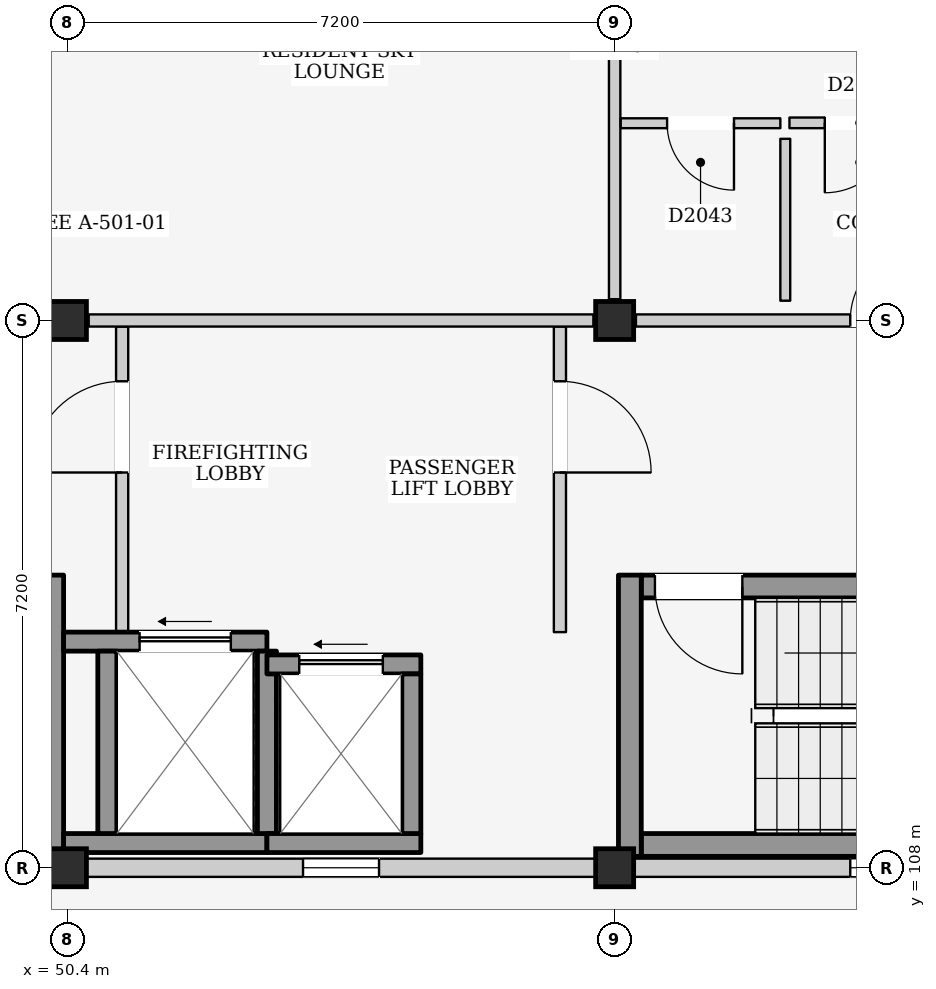
"""IFC4 building model, lengths in metres.
Left out: names, types, materials, properties, quantities, classifications, styles, units other than length and angle.
Written with IfcOpenShell. Run it as: python <this file> out.ifc"""

import sys

from ifc_helpers import new_model, si_unit, direction, frame, frame_2d, origin, origin_2d, place, context, subcontext, project, spatial, rectangle, extrude, element, fill, save


model = new_model("IFC4")
c1 = context("Model", 3, precision=1e-05, world=origin(), true_north=direction((0.0, 1.0)))
c2 = subcontext(c1, "Body", "Model", "MODEL_VIEW")
j1 = project(units=[si_unit("LENGTHUNIT", "METRE"), si_unit("PLANEANGLEUNIT", "RADIAN")], contexts=[c1])
p1 = place(None, origin())
s1 = spatial("IfcSite", under=j1, at=p1, CompositionType="ELEMENT")
p2 = place(p1, origin())
s2 = spatial("IfcBuilding", under=s1, at=p2, CompositionType="ELEMENT")
p3 = place(p2, frame((0.0, 0.0, 44.4)))
s3 = spatial("IfcBuildingStorey", under=s2, at=p3, CompositionType="ELEMENT", Elevation=44.4)
for number, where, z_axis, x_axis in (
    (1, (50.4, 108.0, 0.0), (0.0, 0.0, 1.0), (1.0, 0.0, 0.0)),
    (2, (50.4, 115.2, 0.0), (0.0, 0.0, 1.0), (1.0, 0.0, 0.0)),
    (3, (57.6, 108.0, 0.0), (0.0, 0.0, 1.0), (1.0, 0.0, 0.0)),
    (4, (57.6, 115.2, 0.0), (0.0, 0.0, 1.0), (1.0, 0.0, 0.0)),
):
    element("IfcColumn", number, at=place(p3, frame(where, z_axis=z_axis, x_axis=x_axis)), inside=s3, PredefinedType="COLUMN", context=c2, shape_type="SweptSolid", body=[
        extrude(rectangle(XDim=0.5, YDim=0.5, at=origin_2d()), origin(), (0.0, 0.0, 1.0), 3.3),
    ])
p4 = place(p3, frame((50.65, 108.0, 0.0), z_axis=(0.0, 0.0, 1.0), x_axis=(1.0, 0.0, 0.0)))
e5 = element("IfcWall", 5, at=p4, inside=s3, PredefinedType="ELEMENTEDWALL", context=c2, shape_type="SweptSolid", body=[
    extrude(rectangle(XDim=6.7, YDim=0.24, at=frame_2d((3.35, 0.0))), origin(), (0.0, 0.0, 1.0), 2.415),
])
p5 = place(p4, frame((2.85, 0.0, 1.2)))
e6 = element("IfcOpeningElement", 6, at=p5, cuts=e5, PredefinedType="OPENING", context=c2, shape_type="SweptSolid", body=[
    extrude(rectangle(XDim=1.0, YDim=0.9, at=frame_2d((0.5, 0.45))), frame((0.0, 0.135, 0.0), z_axis=(0.0, -1.0, 0.0), x_axis=(1.0, 0.0, 0.0)), (0.0, 0.0, 1.0), 0.27),
])
p6 = place(p3, frame((57.85, 108.0, 0.0), z_axis=(0.0, 0.0, 1.0), x_axis=(1.0, 0.0, 0.0)))
e7 = element("IfcWall", 7, at=p6, inside=s3, PredefinedType="ELEMENTEDWALL", context=c2, shape_type="SweptSolid", body=[
    extrude(rectangle(XDim=6.7, YDim=0.24, at=frame_2d((3.35, 0.0))), origin(), (0.0, 0.0, 1.0), 2.415),
])
p7 = place(p6, frame((2.85, 0.0, 1.2)))
e8 = element("IfcOpeningElement", 8, at=p7, cuts=e7, PredefinedType="OPENING", context=c2, shape_type="SweptSolid", body=[
    extrude(rectangle(XDim=1.0, YDim=0.9, at=frame_2d((0.5, 0.45))), frame((0.0, 0.135, 0.0), z_axis=(0.0, -1.0, 0.0), x_axis=(1.0, 0.0, 0.0)), (0.0, 0.0, 1.0), 0.27),
])
p8 = place(p3, frame((50.2, 108.15, 0.0), z_axis=(0.0, 0.0, 1.0), x_axis=(0.0, 1.0, 0.0)))
e9 = element("IfcWall", 9, at=p8, inside=s3, PredefinedType="SHEAR", context=c2, shape_type="SweptSolid", body=[
    extrude(rectangle(XDim=3.7, YDim=0.3, at=frame_2d((1.85, 0.0))), origin(), (0.0, 0.0, 1.0), 3.08),
])
p9 = place(p3, frame((51.12, 111.1, 0.0), z_axis=(0.0, 0.0, 1.0), x_axis=(0.0, 1.0, 0.0)))
e10 = element("IfcWall", 10, at=p9, inside=s3, PredefinedType="PARTITIONING", context=c2, shape_type="SweptSolid", body=[
    extrude(rectangle(XDim=4.02, YDim=0.16, at=frame_2d((2.01, 0.0))), origin(), (0.0, 0.0, 1.0), 3.08),
])
p10 = place(p9, frame((2.1, 0.0, 0.0)))
e11 = element("IfcOpeningElement", 11, at=p10, cuts=e10, PredefinedType="OPENING", context=c2, shape_type="SweptSolid", body=[
    extrude(rectangle(XDim=1.2, YDim=2.2, at=frame_2d((0.6, 1.1))), frame((0.0, 0.095, 0.0), z_axis=(0.0, -1.0, 0.0), x_axis=(1.0, 0.0, 0.0)), (0.0, 0.0, 1.0), 0.19),
])
p11 = place(p3, frame((56.88, 111.1, 0.0), z_axis=(0.0, 0.0, 1.0), x_axis=(0.0, 1.0, 0.0)))
e12 = element("IfcWall", 12, at=p11, inside=s3, PredefinedType="PARTITIONING", context=c2, shape_type="SweptSolid", body=[
    extrude(rectangle(XDim=4.02, YDim=0.16, at=frame_2d((2.01, 0.0))), origin(), (0.0, 0.0, 1.0), 3.08),
])
p12 = place(p11, frame((2.1, 0.0, 0.0)))
e13 = element("IfcOpeningElement", 13, at=p12, cuts=e12, PredefinedType="OPENING", context=c2, shape_type="SweptSolid", body=[
    extrude(rectangle(XDim=1.2, YDim=2.2, at=frame_2d((0.6, 1.1))), frame((0.0, 0.095, 0.0), z_axis=(0.0, -1.0, 0.0), x_axis=(1.0, 0.0, 0.0)), (0.0, 0.0, 1.0), 0.19),
])
p13 = place(p3, frame((50.35, 108.325, 0.0), z_axis=(0.0, 0.0, 1.0), x_axis=(1.0, 0.0, 0.0)))
e14 = element("IfcWall", 14, at=p13, inside=s3, PredefinedType="SHEAR", context=c2, shape_type="SweptSolid", body=[
    extrude(rectangle(XDim=2.675, YDim=0.25, at=frame_2d((1.337, 0.0))), origin(), (0.0, 0.0, 1.0), 3.08),
])
p14 = place(p3, frame((50.35, 110.975, 0.0), z_axis=(0.0, 0.0, 1.0), x_axis=(1.0, 0.0, 0.0)))
e15 = element("IfcWall", 15, at=p14, inside=s3, PredefinedType="SHEAR", context=c2, shape_type="SweptSolid", body=[
    extrude(rectangle(XDim=2.675, YDim=0.25, at=frame_2d((1.337, 0.0))), origin(), (0.0, 0.0, 1.0), 3.08),
])
p15 = place(p14, frame((1.0, 0.0, 0.0)))
e16 = element("IfcOpeningElement", 16, at=p15, cuts=e15, PredefinedType="OPENING", context=c2, shape_type="SweptSolid", body=[
    extrude(rectangle(XDim=1.2, YDim=2.25, at=frame_2d((0.6, 1.125))), frame((0.0, 0.14, 0.0), z_axis=(0.0, -1.0, 0.0), x_axis=(1.0, 0.0, 0.0)), (0.0, 0.0, 1.0), 0.28),
])
for number, where, z_axis, x_axis in (
    (17, (50.925, 108.45, 0.0), (0.0, 0.0, 1.0), (0.0, 1.0, 0.0)),
    (18, (53.025, 108.45, 0.0), (0.0, 0.0, 1.0), (0.0, 1.0, 0.0)),
):
    element("IfcWall", number, at=place(p3, frame(where, z_axis=z_axis, x_axis=x_axis)), inside=s3, PredefinedType="SHEAR", context=c2, shape_type="SweptSolid", body=[
        extrude(rectangle(XDim=2.4, YDim=0.25, at=frame_2d((1.2, 0.0))), origin(), (0.0, 0.0, 1.0), 3.08),
    ])
p16 = place(p3, frame((53.025, 108.325, 0.0), z_axis=(0.0, 0.0, 1.0), x_axis=(1.0, 0.0, 0.0)))
e19 = element("IfcWall", 19, at=p16, inside=s3, PredefinedType="SHEAR", context=c2, shape_type="SweptSolid", body=[
    extrude(rectangle(XDim=2.025, YDim=0.25, at=frame_2d((1.013, 0.0))), origin(), (0.0, 0.0, 1.0), 3.08),
])
p17 = place(p3, frame((53.025, 110.675, 0.0), z_axis=(0.0, 0.0, 1.0), x_axis=(1.0, 0.0, 0.0)))
e20 = element("IfcWall", 20, at=p17, inside=s3, PredefinedType="SHEAR", context=c2, shape_type="SweptSolid", body=[
    extrude(rectangle(XDim=2.025, YDim=0.25, at=frame_2d((1.013, 0.0))), origin(), (0.0, 0.0, 1.0), 3.08),
])
p18 = place(p17, frame((0.425, 0.0, 0.0)))
e21 = element("IfcOpeningElement", 21, at=p18, cuts=e20, PredefinedType="OPENING", context=c2, shape_type="SweptSolid", body=[
    extrude(rectangle(XDim=1.1, YDim=2.15, at=frame_2d((0.55, 1.075))), frame((0.0, 0.14, 0.0), z_axis=(0.0, -1.0, 0.0), x_axis=(1.0, 0.0, 0.0)), (0.0, 0.0, 1.0), 0.28),
])
p19 = place(p3, frame((54.925, 108.45, 0.0), z_axis=(0.0, 0.0, 1.0), x_axis=(0.0, 1.0, 0.0)))
e22 = element("IfcWall", 22, at=p19, inside=s3, PredefinedType="SHEAR", context=c2, shape_type="SweptSolid", body=[
    extrude(rectangle(XDim=2.1, YDim=0.25, at=frame_2d((1.05, 0.0))), origin(), (0.0, 0.0, 1.0), 3.08),
])
p20 = place(p3, frame((57.95, 108.3, 0.0), z_axis=(0.0, 0.0, 1.0), x_axis=(1.0, 0.0, 0.0)))
e23 = element("IfcWall", 23, at=p20, inside=s3, PredefinedType="SHEAR", context=c2, shape_type="SweptSolid", body=[
    extrude(rectangle(XDim=6.5, YDim=0.3, at=frame_2d((3.25, 0.0))), origin(), (0.0, 0.0, 1.0), 3.08),
])
p21 = place(p3, frame((57.95, 111.7, 0.0), z_axis=(0.0, 0.0, 1.0), x_axis=(1.0, 0.0, 0.0)))
e24 = element("IfcWall", 24, at=p21, inside=s3, PredefinedType="SHEAR", context=c2, shape_type="SweptSolid", body=[
    extrude(rectangle(XDim=6.5, YDim=0.3, at=frame_2d((3.25, 0.0))), origin(), (0.0, 0.0, 1.0), 3.08),
])
p22 = place(p21, frame((0.18, 0.0, 0.0)))
e25 = element("IfcOpeningElement", 25, at=p22, cuts=e24, PredefinedType="OPENING", context=c2, shape_type="SweptSolid", body=[
    extrude(rectangle(XDim=1.15, YDim=2.2, at=frame_2d((0.575, 1.1))), frame((0.0, 0.165, 0.0), z_axis=(0.0, -1.0, 0.0), x_axis=(1.0, 0.0, 0.0)), (0.0, 0.0, 1.0), 0.33),
])
p23 = place(p3, frame((57.8, 108.15, 0.0), z_axis=(0.0, 0.0, 1.0), x_axis=(0.0, 1.0, 0.0)))
e26 = element("IfcWall", 26, at=p23, inside=s3, PredefinedType="SHEAR", context=c2, shape_type="SweptSolid", body=[
    extrude(rectangle(XDim=3.7, YDim=0.3, at=frame_2d((1.85, 0.0))), origin(), (0.0, 0.0, 1.0), 3.08),
])
p24 = place(p3, frame((50.68, 115.2, 0.0), z_axis=(0.0, 0.0, 1.0), x_axis=(1.0, 0.0, 0.0)))
e27 = element("IfcWall", 27, at=p24, inside=s3, PredefinedType="PARTITIONING", context=c2, shape_type="SweptSolid", body=[
    extrude(rectangle(XDim=6.64, YDim=0.16, at=frame_2d((3.32, 0.0))), origin(), (0.0, 0.0, 1.0), 2.415),
])
p25 = place(p3, frame((57.6, 115.48, 0.0), z_axis=(0.0, 0.0, 1.0), x_axis=(0.0, 1.0, 0.0)))
e28 = element("IfcWall", 28, at=p25, inside=s3, PredefinedType="PARTITIONING", context=c2, shape_type="SweptSolid", body=[
    extrude(rectangle(XDim=6.64, YDim=0.15, at=frame_2d((3.32, 0.0))), origin(), (0.0, 0.0, 1.0), 2.565),
])
p26 = place(p3, frame((57.88, 115.2, 0.0), z_axis=(0.0, 0.0, 1.0), x_axis=(1.0, 0.0, 0.0)))
e29 = element("IfcWall", 29, at=p26, inside=s3, PredefinedType="PARTITIONING", context=c2, shape_type="SweptSolid", body=[
    extrude(rectangle(XDim=6.64, YDim=0.16, at=frame_2d((3.32, 0.0))), origin(), (0.0, 0.0, 1.0), 2.415),
])
p27 = place(p26, frame((2.82, 0.0, 0.0)))
e30 = element("IfcOpeningElement", 30, at=p27, cuts=e29, PredefinedType="OPENING", context=c2, shape_type="SweptSolid", body=[
    extrude(rectangle(XDim=1.0, YDim=2.15, at=frame_2d((0.5, 1.075))), frame((0.0, 0.095, 0.0), z_axis=(0.0, -1.0, 0.0), x_axis=(1.0, 0.0, 0.0)), (0.0, 0.0, 1.0), 0.19),
])
p28 = place(p3, frame((57.68, 117.795, 0.0), z_axis=(0.0, 0.0, 1.0), x_axis=(1.0, 0.0, 0.0)))
e31 = element("IfcWall", 31, at=p28, inside=s3, PredefinedType="PARTITIONING", context=c2, shape_type="SweptSolid", body=[
    extrude(rectangle(XDim=2.1, YDim=0.13, at=frame_2d((1.05, 0.0))), origin(), (0.0, 0.0, 1.0), 3.08),
])
p29 = place(p28, frame((0.61, 0.0, 0.0)))
e32 = element("IfcOpeningElement", 32, at=p29, cuts=e31, PredefinedType="OPENING", context=c2, shape_type="SweptSolid", body=[
    extrude(rectangle(XDim=0.88, YDim=2.1, at=frame_2d((0.44, 1.05))), frame((0.0, 0.08, 0.0), z_axis=(0.0, -1.0, 0.0), x_axis=(1.0, 0.0, 0.0)), (0.0, 0.0, 1.0), 0.16),
])
p30 = place(p3, frame((59.845, 115.46, 0.0), z_axis=(0.0, 0.0, 1.0), x_axis=(0.0, 1.0, 0.0)))
e33 = element("IfcWall", 33, at=p30, inside=s3, PredefinedType="PARTITIONING", context=c2, shape_type="SweptSolid", body=[
    extrude(rectangle(XDim=2.13, YDim=0.13, at=frame_2d((1.065, 0.0))), origin(), (0.0, 0.0, 1.0), 3.08),
])
p31 = place(p3, frame((59.9, 117.8, 0.0), z_axis=(0.0, 0.0, 1.0), x_axis=(1.0, 0.0, 0.0)))
e34 = element("IfcWall", 34, at=p31, inside=s3, PredefinedType="PARTITIONING", context=c2, shape_type="SweptSolid", body=[
    extrude(rectangle(XDim=1.85, YDim=0.14, at=frame_2d((0.925, 0.0))), origin(), (0.0, 0.0, 1.0), 3.08),
])
p32 = place(p31, frame((0.465, 0.0, 0.0)))
e35 = element("IfcOpeningElement", 35, at=p32, cuts=e34, PredefinedType="OPENING", context=c2, shape_type="SweptSolid", body=[
    extrude(rectangle(XDim=0.92, YDim=2.1, at=frame_2d((0.46, 1.05))), frame((0.0, 0.085, 0.0), z_axis=(0.0, -1.0, 0.0), x_axis=(1.0, 0.0, 0.0)), (0.0, 0.0, 1.0), 0.17),
])
p33 = place(p5, origin())
e36 = element("IfcWindow", 36, at=p33, inside=s3, PartitioningType="SINGLE_PANEL", PredefinedType="WINDOW", context=c2, shape_type="SweptSolid", body=[
    extrude(rectangle(XDim=1.0, YDim=0.9, at=frame_2d((0.5, 0.45))), frame((0.0, 0.03, 0.0), z_axis=(0.0, -1.0, 0.0), x_axis=(1.0, 0.0, 0.0)), (0.0, 0.0, 1.0), 0.06),
])
fill(e6, e36)
p34 = place(p7, origin())
e37 = element("IfcWindow", 37, at=p34, inside=s3, PartitioningType="SINGLE_PANEL", PredefinedType="WINDOW", context=c2, shape_type="SweptSolid", body=[
    extrude(rectangle(XDim=1.0, YDim=0.9, at=frame_2d((0.5, 0.45))), frame((0.0, 0.03, 0.0), z_axis=(0.0, -1.0, 0.0), x_axis=(1.0, 0.0, 0.0)), (0.0, 0.0, 1.0), 0.06),
])
fill(e8, e37)
p35 = place(p10, origin())
e38 = element("IfcDoor", 38, at=p35, inside=s3, OperationType="SINGLE_SWING_LEFT", PredefinedType="DOOR", context=c2, shape_type="SweptSolid", body=[
    extrude(rectangle(XDim=1.2, YDim=2.2, at=frame_2d((0.6, 1.1))), frame((0.0, 0.025, 0.0), z_axis=(0.0, -1.0, 0.0), x_axis=(1.0, 0.0, 0.0)), (0.0, 0.0, 1.0), 0.05),
])
fill(e11, e38)
p36 = place(p12, frame((1.2, 0.0, 0.0), z_axis=(0.0, 0.0, 1.0), x_axis=(-1.0, 0.0, 0.0)))
e39 = element("IfcDoor", 39, at=p36, inside=s3, OperationType="SINGLE_SWING_RIGHT", PredefinedType="DOOR", context=c2, shape_type="SweptSolid", body=[
    extrude(rectangle(XDim=1.2, YDim=2.2, at=frame_2d((0.6, 1.1))), frame((0.0, 0.025, 0.0), z_axis=(0.0, -1.0, 0.0), x_axis=(1.0, 0.0, 0.0)), (0.0, 0.0, 1.0), 0.05),
])
fill(e13, e39)
p37 = place(p15, origin())
e40 = element("IfcDoor", 40, at=p37, inside=s3, OperationType="SLIDING_TO_LEFT", PredefinedType="DOOR", context=c2, shape_type="SweptSolid", body=[
    extrude(rectangle(XDim=1.2, YDim=2.25, at=frame_2d((0.6, 1.125))), frame((0.0, 0.025, 0.0), z_axis=(0.0, -1.0, 0.0), x_axis=(1.0, 0.0, 0.0)), (0.0, 0.0, 1.0), 0.05),
])
fill(e16, e40)
p38 = place(p18, origin())
e41 = element("IfcDoor", 41, at=p38, inside=s3, OperationType="SLIDING_TO_LEFT", PredefinedType="DOOR", context=c2, shape_type="SweptSolid", body=[
    extrude(rectangle(XDim=1.1, YDim=2.15, at=frame_2d((0.55, 1.075))), frame((0.0, 0.025, 0.0), z_axis=(0.0, -1.0, 0.0), x_axis=(1.0, 0.0, 0.0)), (0.0, 0.0, 1.0), 0.05),
])
fill(e21, e41)
p39 = place(p22, frame((1.15, 0.0, 0.0), z_axis=(0.0, 0.0, 1.0), x_axis=(-1.0, 0.0, 0.0)))
e42 = element("IfcDoor", 42, at=p39, inside=s3, OperationType="SINGLE_SWING_LEFT", PredefinedType="DOOR", context=c2, shape_type="SweptSolid", body=[
    extrude(rectangle(XDim=1.15, YDim=2.2, at=frame_2d((0.575, 1.1))), frame((0.0, 0.025, 0.0), z_axis=(0.0, -1.0, 0.0), x_axis=(1.0, 0.0, 0.0)), (0.0, 0.0, 1.0), 0.05),
])
fill(e25, e42)
p40 = place(p27, origin())
e43 = element("IfcDoor", 43, at=p40, inside=s3, OperationType="SINGLE_SWING_RIGHT", PredefinedType="DOOR", context=c2, shape_type="SweptSolid", body=[
    extrude(rectangle(XDim=1.0, YDim=2.15, at=frame_2d((0.5, 1.075))), frame((0.0, 0.025, 0.0), z_axis=(0.0, -1.0, 0.0), x_axis=(1.0, 0.0, 0.0)), (0.0, 0.0, 1.0), 0.05),
])
fill(e30, e43)
p41 = place(p29, frame((0.88, 0.0, 0.0), z_axis=(0.0, 0.0, 1.0), x_axis=(-1.0, 0.0, 0.0)))
e44 = element("IfcDoor", 44, at=p41, inside=s3, OperationType="SINGLE_SWING_LEFT", PredefinedType="DOOR", context=c2, shape_type="SweptSolid", body=[
    extrude(rectangle(XDim=0.88, YDim=2.1, at=frame_2d((0.44, 1.05))), frame((0.0, 0.025, 0.0), z_axis=(0.0, -1.0, 0.0), x_axis=(1.0, 0.0, 0.0)), (0.0, 0.0, 1.0), 0.05),
])
fill(e32, e44)
p42 = place(p32, frame((0.92, 0.0, 0.0), z_axis=(0.0, 0.0, 1.0), x_axis=(-1.0, 0.0, 0.0)))
e45 = element("IfcDoor", 45, at=p42, inside=s3, OperationType="SINGLE_SWING_RIGHT", PredefinedType="DOOR", context=c2, shape_type="SweptSolid", body=[
    extrude(rectangle(XDim=0.92, YDim=2.1, at=frame_2d((0.46, 1.05))), frame((0.0, 0.025, 0.0), z_axis=(0.0, -1.0, 0.0), x_axis=(1.0, 0.0, 0.0)), (0.0, 0.0, 1.0), 0.05),
])
fill(e35, e45)
save(model, sys.argv[1])
